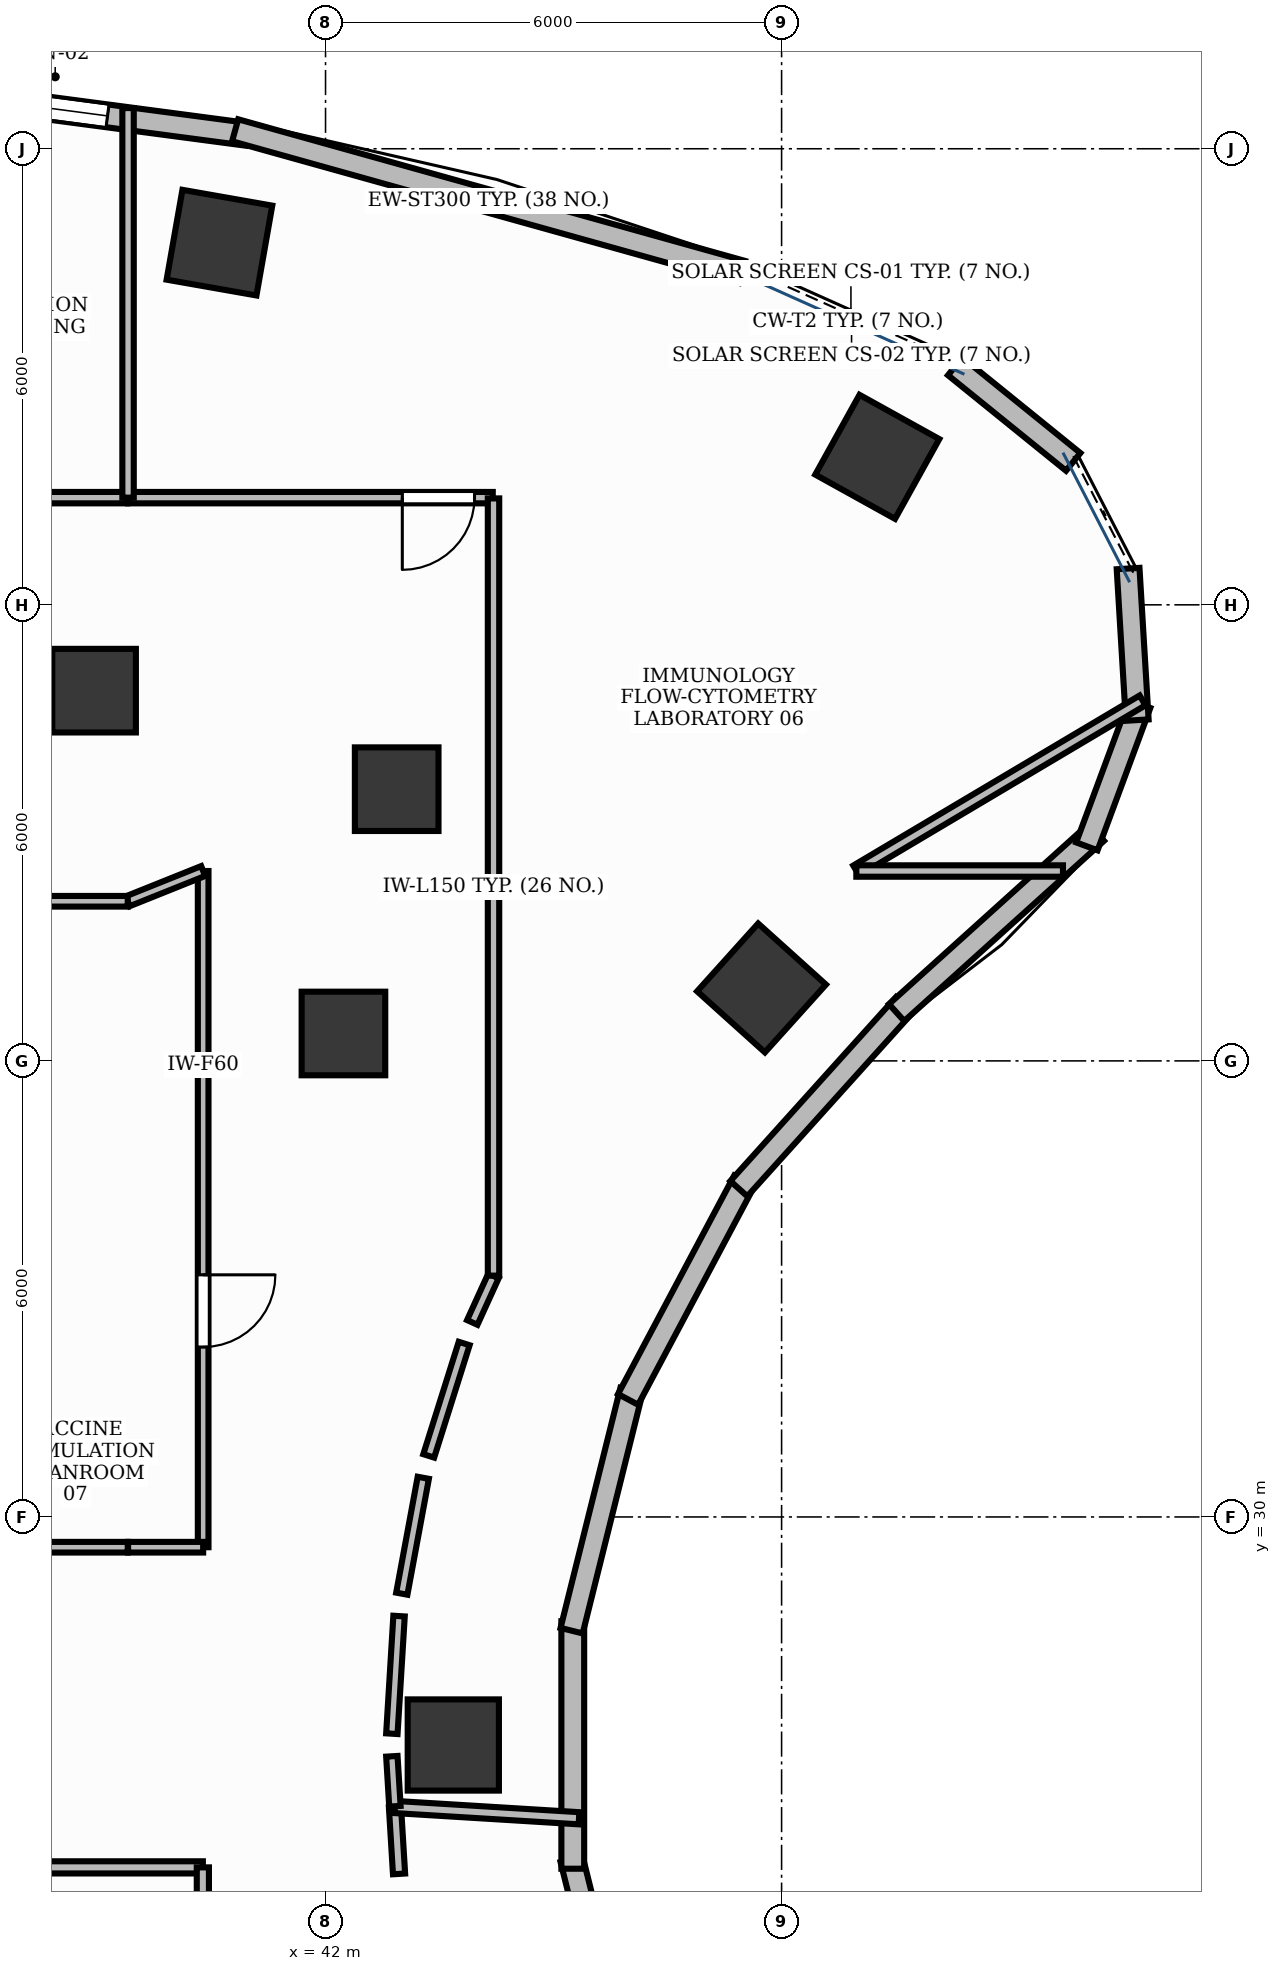
"""IFC4 building model, lengths in metres.
Left out: names, types, materials, properties, quantities, classifications, styles, units other than length and angle.
Written with IfcOpenShell. Run it as: python <this file> out.ifc"""

import sys

from ifc_helpers import new_model, si_unit, direction, frame, frame_2d, origin, origin_2d, place, context, subcontext, project, spatial, rectangle, extrude, element, fill, save


model = new_model("IFC4")
c1 = context("Model", 3, precision=1e-05, world=origin(), true_north=direction((0.0, 1.0)))
c2 = subcontext(c1, "Body", "Model", "MODEL_VIEW")
j1 = project(units=[si_unit("LENGTHUNIT", "METRE"), si_unit("PLANEANGLEUNIT", "RADIAN")], contexts=[c1])
p1 = place(None, origin())
s1 = spatial("IfcSite", under=j1, at=p1, CompositionType="ELEMENT")
p2 = place(p1, origin())
s2 = spatial("IfcBuilding", under=s1, at=p2, CompositionType="ELEMENT")
p3 = place(p2, frame((0.0, 0.0, 90.0)))
s3 = spatial("IfcBuildingStorey", under=s2, at=p3, CompositionType="ELEMENT", Elevation=90.0)
p4 = place(p3, frame((49.259, 43.947, -0.0), z_axis=(0.0, 0.0, 1.0), x_axis=(-0.874535078577, 0.484962262797, 0.0)))
e1 = element("IfcColumn", 1, at=p4, inside=s3, PredefinedType="COLUMN", context=c2, shape_type="SweptSolid", body=[
    extrude(rectangle(XDim=1.2, YDim=1.2, at=origin_2d()), origin(), (0.0, 0.0, 1.0), 3.901),
])
p5 = place(p3, frame((42.936, 39.575, -0.0), z_axis=(0.0, 0.0, 1.0), x_axis=(1.0, 0.0, 0.0)))
e2 = element("IfcColumn", 2, at=p5, inside=s3, PredefinedType="COLUMN", context=c2, shape_type="SweptSolid", body=[
    extrude(rectangle(XDim=1.1, YDim=1.1, at=origin_2d()), origin(), (0.0, 0.0, 1.0), 3.901),
])
p6 = place(p3, frame((40.604, 46.765, -0.0), z_axis=(0.0, 0.0, 1.0), x_axis=(-0.984868307662, 0.173304404339, 0.0)))
e3 = element("IfcColumn", 3, at=p6, inside=s3, PredefinedType="COLUMN", context=c2, shape_type="SweptSolid", body=[
    extrude(rectangle(XDim=1.2, YDim=1.2, at=origin_2d()), origin(), (0.0, 0.0, 1.0), 3.901),
])
p7 = place(p3, frame((38.955, 40.871, -0.0), z_axis=(0.0, 0.0, 1.0), x_axis=(1.0, 0.0, 0.0)))
e4 = element("IfcColumn", 4, at=p7, inside=s3, PredefinedType="COLUMN", context=c2, shape_type="SweptSolid", body=[
    extrude(rectangle(XDim=1.1, YDim=1.1, at=origin_2d()), origin(), (0.0, 0.0, 1.0), 3.901),
])
for number, where, z_axis, x_axis in (
    (5, (43.681, 27.0, -0.0), (0.0, 0.0, 1.0), (0.0, 1.0, 0.0)),
    (6, (47.736, 36.96, -0.0), (0.0, 0.0, 1.0), (0.669, 0.743, 0.0)),
):
    element("IfcColumn", number, at=place(p3, frame(where, z_axis=z_axis, x_axis=x_axis)), inside=s3, PredefinedType="COLUMN", context=c2, shape_type="SweptSolid", body=[
        extrude(rectangle(XDim=1.2, YDim=1.2, at=origin_2d()), origin(), (0.0, 0.0, 1.0), 3.901),
    ])
p8 = place(p3, frame((42.236, 36.361, -0.0), z_axis=(0.0, 0.0, 1.0), x_axis=(1.0, 0.0, 0.0)))
e7 = element("IfcColumn", 7, at=p8, inside=s3, PredefinedType="COLUMN", context=c2, shape_type="SweptSolid", body=[
    extrude(rectangle(XDim=1.1, YDim=1.1, at=origin_2d()), origin(), (0.0, 0.0, 1.0), 3.901),
])
p9 = place(p3, frame((40.964, 48.19, 0.0), z_axis=(0.0, 0.0, 1.0), x_axis=(-0.991369257822, 0.131099178664, 0.0)))
e8 = element("IfcWall", 8, at=p9, inside=s3, PredefinedType="STANDARD", context=c2, shape_type="SweptSolid", body=[
    extrude(rectangle(XDim=3.575, YDim=0.3, at=frame_2d((1.788, 0.0))), origin(), (0.0, 0.0, 1.0), 3.47),
])
p10 = place(p9, frame((1.848, 0.0, 0.95)))
e9 = element("IfcOpeningElement", 9, at=p10, cuts=e8, PredefinedType="OPENING", context=c2, shape_type="SweptSolid", body=[
    extrude(rectangle(XDim=1.5, YDim=1.8, at=frame_2d((0.75, 0.9))), frame((0.0, 0.165, 0.0), z_axis=(0.0, -1.0, 0.0), x_axis=(1.0, 0.0, 0.0)), (0.0, 0.0, 1.0), 0.33),
])
p11 = place(p3, frame((47.479, 46.38, 0.0), z_axis=(0.0, 0.0, 1.0), x_axis=(-0.963116215402, 0.269085777459, 0.0)))
e10 = element("IfcWall", 10, at=p11, inside=s3, PredefinedType="STANDARD", context=c2, shape_type="SweptSolid", body=[
    extrude(rectangle(XDim=6.924, YDim=0.3, at=frame_2d((3.462, 0.0))), origin(), (0.0, 0.0, 1.0), 3.9),
])
p12 = place(p3, frame((46.025, 22.337, 0.0), z_axis=(0.0, 0.0, 1.0), x_axis=(-0.241900409149, 0.970301083197, 0.0)))
e11 = element("IfcWall", 11, at=p12, inside=s3, PredefinedType="STANDARD", context=c2, shape_type="SweptSolid", body=[
    extrude(rectangle(XDim=3.256, YDim=0.3, at=frame_2d((1.628, 0.0))), origin(), (0.0, 0.0, 1.0), 3.9),
])
p13 = place(p3, frame((45.253, 25.372, 0.0), z_axis=(0.0, 0.0, 1.0), x_axis=(0.0, 1.0, 0.0)))
e12 = element("IfcWall", 12, at=p13, inside=s3, PredefinedType="STANDARD", context=c2, shape_type="SweptSolid", body=[
    extrude(rectangle(XDim=3.255, YDim=0.3, at=frame_2d((1.628, 0.0))), origin(), (0.0, 0.0, 1.0), 3.9),
])
p14 = place(p3, frame((45.238, 28.504, 0.0), z_axis=(0.0, 0.0, 1.0), x_axis=(0.241900409149, 0.970301083197, 0.0)))
e13 = element("IfcWall", 13, at=p14, inside=s3, PredefinedType="STANDARD", context=c2, shape_type="SweptSolid", body=[
    extrude(rectangle(XDim=3.256, YDim=0.3, at=frame_2d((1.628, 0.0))), origin(), (0.0, 0.0, 1.0), 3.9),
])
p15 = place(p3, frame((45.98, 31.547, 0.0), z_axis=(0.0, 0.0, 1.0), x_axis=(0.469451284634, 0.882958374645, 0.0)))
e14 = element("IfcWall", 14, at=p15, inside=s3, PredefinedType="STANDARD", context=c2, shape_type="SweptSolid", body=[
    extrude(rectangle(XDim=3.256, YDim=0.3, at=frame_2d((1.628, 0.0))), origin(), (0.0, 0.0, 1.0), 3.9),
])
p16 = place(p3, frame((47.437, 34.319, 0.0), z_axis=(0.0, 0.0, 1.0), x_axis=(0.669167727967, 0.743111399353, 0.0)))
e15 = element("IfcWall", 15, at=p16, inside=s3, PredefinedType="STANDARD", context=c2, shape_type="SweptSolid", body=[
    extrude(rectangle(XDim=3.255, YDim=0.3, at=frame_2d((1.628, 0.0))), origin(), (0.0, 0.0, 1.0), 3.9),
])
p17 = place(p3, frame((49.513, 36.636, 0.0), z_axis=(0.0, 0.0, 1.0), x_axis=(0.74255963233, 0.669779958221, 0.0)))
e16 = element("IfcWall", 16, at=p17, inside=s3, PredefinedType="STANDARD", context=c2, shape_type="SweptSolid", body=[
    extrude(rectangle(XDim=3.539, YDim=0.3, at=frame_2d((1.77, 0.0))), origin(), (0.0, 0.0, 1.0), 3.9),
])
p18 = place(p3, frame((52.016, 38.822, 0.0), z_axis=(0.0, 0.0, 1.0), x_axis=(0.347370087337, 0.937728117539, 0.0)))
e17 = element("IfcWall", 17, at=p18, inside=s3, PredefinedType="STANDARD", context=c2, shape_type="SweptSolid", body=[
    extrude(rectangle(XDim=1.997, YDim=0.3, at=frame_2d((0.999, 0.0))), origin(), (0.0, 0.0, 1.0), 3.9),
])
for number, where, z_axis, x_axis in (
    (18, (52.679, 40.483, 0.0), (0.0, 0.0, 1.0), (-0.06, 0.998, 0.0)),
    (19, (51.836, 43.881, 0.0), (0.0, 0.0, 1.0), (-0.777, 0.629, 0.0)),
):
    element("IfcWall", number, at=place(p3, frame(where, z_axis=z_axis, x_axis=x_axis)), inside=s3, PredefinedType="STANDARD", context=c2, shape_type="SweptSolid", body=[
        extrude(rectangle(XDim=1.998, YDim=0.3, at=frame_2d((0.999, 0.0))), origin(), (0.0, 0.0, 1.0), 3.9),
    ])
p19 = place(p3, frame((44.2, 43.41, 0.0), z_axis=(0.0, 0.0, 1.0), x_axis=(-1.0, 0.0, 0.0)))
e20 = element("IfcWall", 20, at=p19, inside=s3, PredefinedType="PARTITIONING", context=c2, shape_type="SweptSolid", body=[
    extrude(rectangle(XDim=4.798, YDim=0.15, at=frame_2d((2.399, 0.0))), origin(), (0.0, 0.0, 1.0), 2.91),
])
p20 = place(p19, frame((0.24, 0.0, 0.0)))
e21 = element("IfcOpeningElement", 21, at=p20, cuts=e20, PredefinedType="OPENING", context=c2, shape_type="SweptSolid", body=[
    extrude(rectangle(XDim=0.95, YDim=2.15, at=frame_2d((0.475, 1.075))), frame((0.0, 0.09, 0.0), z_axis=(0.0, -1.0, 0.0), x_axis=(1.0, 0.0, 0.0)), (0.0, 0.0, 1.0), 0.18),
])
p21 = place(p3, frame((40.39, 38.498, 0.0), z_axis=(0.0, 0.0, 1.0), x_axis=(0.0, -1.0, 0.0)))
e22 = element("IfcWall", 22, at=p21, inside=s3, PredefinedType="PARTITIONING", context=c2, shape_type="SweptSolid", body=[
    extrude(rectangle(XDim=8.896, YDim=0.14, at=frame_2d((4.448, 0.0))), origin(), (0.0, 0.0, 1.0), 2.91),
])
p22 = place(p21, frame((5.312, 0.0, 0.0)))
e23 = element("IfcOpeningElement", 23, at=p22, cuts=e22, PredefinedType="OPENING", context=c2, shape_type="SweptSolid", body=[
    extrude(rectangle(XDim=0.95, YDim=2.15, at=frame_2d((0.475, 1.075))), frame((0.0, 0.085, 0.0), z_axis=(0.0, -1.0, 0.0), x_axis=(1.0, 0.0, 0.0)), (0.0, 0.0, 1.0), 0.17),
])
p23 = place(p3, frame((39.392, 43.41, 0.0), z_axis=(0.0, 0.0, 1.0), x_axis=(-1.0, 0.0, 0.0)))
e24 = element("IfcWall", 24, at=p23, inside=s3, PredefinedType="PARTITIONING", context=c2, shape_type="SweptSolid", body=[
    extrude(rectangle(XDim=4.196, YDim=0.15, at=frame_2d((2.098, 0.0))), origin(), (0.0, 0.0, 1.0), 2.91),
])
p24 = place(p23, frame((2.748, 0.0, 0.0)))
e25 = element("IfcOpeningElement", 25, at=p24, cuts=e24, PredefinedType="OPENING", context=c2, shape_type="SweptSolid", body=[
    extrude(rectangle(XDim=0.95, YDim=2.15, at=frame_2d((0.475, 1.075))), frame((0.0, 0.09, 0.0), z_axis=(0.0, -1.0, 0.0), x_axis=(1.0, 0.0, 0.0)), (0.0, 0.0, 1.0), 0.18),
])
p25 = place(p3, frame((42.967, 25.304, 0.0), z_axis=(0.0, 0.0, 1.0), x_axis=(-0.061188874166, 0.998126205286, 0.0)))
e26 = element("IfcWall", 26, at=p25, inside=s3, PredefinedType="PARTITIONING", context=c2, shape_type="SweptSolid", body=[
    extrude(rectangle(XDim=0.882, YDim=0.16, at=frame_2d((0.441, 0.0))), origin(), (0.0, 0.0, 1.0), 2.91),
])
p26 = place(p3, frame((42.913, 26.184, 0.0), z_axis=(0.0, 0.0, 1.0), x_axis=(0.998138916893, -0.060981165807, 0.0)))
e27 = element("IfcWall", 27, at=p26, inside=s3, PredefinedType="PARTITIONING", context=c2, shape_type="SweptSolid", body=[
    extrude(rectangle(XDim=2.426, YDim=0.16, at=frame_2d((1.213, 0.0))), origin(), (0.0, 0.0, 1.0), 2.91),
])
p27 = place(p3, frame((37.36, 25.39, 0.0), z_axis=(0.0, 0.0, 1.0), x_axis=(1.0, 0.0, 0.0)))
e28 = element("IfcWall", 28, at=p27, inside=s3, PredefinedType="PARTITIONING", context=c2, shape_type="SweptSolid", body=[
    extrude(rectangle(XDim=3.026, YDim=0.16, at=frame_2d((1.513, 0.0))), origin(), (0.0, 0.0, 1.0), 2.91),
])
p28 = place(p3, frame((40.386, 25.39, 0.0), z_axis=(0.0, 0.0, 1.0), x_axis=(0.0, -1.0, 0.0)))
e29 = element("IfcWall", 29, at=p28, inside=s3, PredefinedType="PARTITIONING", context=c2, shape_type="SweptSolid", body=[
    extrude(rectangle(XDim=1.388, YDim=0.16, at=frame_2d((0.694, 0.0))), origin(), (0.0, 0.0, 1.0), 2.91),
])
p29 = place(p3, frame((52.749, 40.743, 0.0), z_axis=(0.0, 0.0, 1.0), x_axis=(-0.85982416837, -0.510590246173, 0.0)))
e30 = element("IfcWall", 30, at=p29, inside=s3, PredefinedType="PARTITIONING", context=c2, shape_type="SweptSolid", body=[
    extrude(rectangle(XDim=4.382, YDim=0.15, at=frame_2d((2.191, 0.0))), origin(), (0.0, 0.0, 1.0), 2.91),
])
p30 = place(p3, frame((48.983, 38.498, 0.0), z_axis=(0.0, 0.0, 1.0), x_axis=(1.0, 0.0, 0.0)))
e31 = element("IfcWall", 31, at=p30, inside=s3, PredefinedType="PARTITIONING", context=c2, shape_type="SweptSolid", body=[
    extrude(rectangle(XDim=2.719, YDim=0.15, at=frame_2d((1.359, 0.0))), origin(), (0.0, 0.0, 1.0), 2.91),
])
p31 = place(p3, frame((42.913, 26.194, 0.0), z_axis=(0.0, 0.0, 1.0), x_axis=(-0.061177910387, 0.998126877346, 0.0)))
e32 = element("IfcWall", 32, at=p31, inside=s3, PredefinedType="PARTITIONING", context=c2, shape_type="SweptSolid", body=[
    extrude(rectangle(XDim=0.658, YDim=0.15, at=frame_2d((0.329, 0.0))), origin(), (0.0, 0.0, 1.0), 2.91),
])
p32 = place(p3, frame((42.873, 27.149, 0.0), z_axis=(0.0, 0.0, 1.0), x_axis=(0.061103659378, 0.99813142562, 0.0)))
e33 = element("IfcWall", 33, at=p32, inside=s3, PredefinedType="PARTITIONING", context=c2, shape_type="SweptSolid", body=[
    extrude(rectangle(XDim=1.55, YDim=0.15, at=frame_2d((0.775, 0.0))), origin(), (0.0, 0.0, 1.0), 2.91),
])
p33 = place(p3, frame((43.003, 28.991, 0.0), z_axis=(0.0, 0.0, 1.0), x_axis=(0.182168192784, 0.983267384559, 0.0)))
e34 = element("IfcWall", 34, at=p33, inside=s3, PredefinedType="PARTITIONING", context=c2, shape_type="SweptSolid", body=[
    extrude(rectangle(XDim=1.551, YDim=0.15, at=frame_2d((0.775, 0.0))), origin(), (0.0, 0.0, 1.0), 2.91),
])
p34 = place(p3, frame((43.358, 30.803, 0.0), z_axis=(0.0, 0.0, 1.0), x_axis=(0.300641414783, 0.953737248783, 0.0)))
e35 = element("IfcWall", 35, at=p34, inside=s3, PredefinedType="PARTITIONING", context=c2, shape_type="SweptSolid", body=[
    extrude(rectangle(XDim=1.55, YDim=0.15, at=frame_2d((0.775, 0.0))), origin(), (0.0, 0.0, 1.0), 2.91),
])
p35 = place(p3, frame((43.93, 32.559, 0.0), z_axis=(0.0, 0.0, 1.0), x_axis=(0.414377467152, 0.910105111905, 0.0)))
e36 = element("IfcWall", 36, at=p35, inside=s3, PredefinedType="PARTITIONING", context=c2, shape_type="SweptSolid", body=[
    extrude(rectangle(XDim=0.672, YDim=0.15, at=frame_2d((0.336, 0.0))), origin(), (0.0, 0.0, 1.0), 2.91),
])
p36 = place(p3, frame((44.21, 33.175, 0.0), z_axis=(0.0, 0.0, 1.0), x_axis=(0.0, 1.0, 0.0)))
e37 = element("IfcWall", 37, at=p36, inside=s3, PredefinedType="PARTITIONING", context=c2, shape_type="SweptSolid", body=[
    extrude(rectangle(XDim=10.225, YDim=0.15, at=frame_2d((5.112, 0.0))), origin(), (0.0, 0.0, 1.0), 2.91),
])
p37 = place(p3, frame((39.402, 43.41, 0.0), z_axis=(0.0, 0.0, 1.0), x_axis=(0.0, 1.0, 0.0)))
e38 = element("IfcWall", 38, at=p37, inside=s3, PredefinedType="PARTITIONING", context=c2, shape_type="SweptSolid", body=[
    extrude(rectangle(XDim=5.125, YDim=0.15, at=frame_2d((2.563, 0.0))), origin(), (0.0, 0.0, 1.0), 2.91),
])
p38 = place(p3, frame((39.398, 38.1, 0.0), z_axis=(0.0, 0.0, 1.0), x_axis=(0.928098124006, 0.372335698284, 0.0)))
e39 = element("IfcWall", 39, at=p38, inside=s3, PredefinedType="PARTITIONING", context=c2, shape_type="SweptSolid", body=[
    extrude(rectangle(XDim=1.069, YDim=0.14, at=frame_2d((0.534, 0.0))), origin(), (0.0, 0.0, 1.0), 2.91),
])
p39 = place(p3, frame((40.39, 29.602, 0.0), z_axis=(0.0, 0.0, 1.0), x_axis=(-1.0, 0.0, 0.0)))
e40 = element("IfcWall", 40, at=p39, inside=s3, PredefinedType="PARTITIONING", context=c2, shape_type="SweptSolid", body=[
    extrude(rectangle(XDim=0.988, YDim=0.14, at=frame_2d((0.494, 0.0))), origin(), (0.0, 0.0, 1.0), 2.91),
])
p40 = place(p3, frame((39.398, 29.602, 0.0), z_axis=(0.0, 0.0, 1.0), x_axis=(-1.0, 0.0, 0.0)))
e41 = element("IfcWall", 41, at=p40, inside=s3, PredefinedType="PARTITIONING", context=c2, shape_type="SweptSolid", body=[
    extrude(rectangle(XDim=2.038, YDim=0.14, at=frame_2d((1.019, 0.0))), origin(), (0.0, 0.0, 1.0), 2.91),
])
p41 = place(p3, frame((37.21, 38.1, 0.0), z_axis=(0.0, 0.0, 1.0), x_axis=(1.0, 0.0, 0.0)))
e42 = element("IfcWall", 42, at=p41, inside=s3, PredefinedType="PARTITIONING", context=c2, shape_type="SweptSolid", body=[
    extrude(rectangle(XDim=2.188, YDim=0.14, at=frame_2d((1.094, 0.0))), origin(), (0.0, 0.0, 1.0), 2.91),
])
p42 = place(p10, origin())
e43 = element("IfcWindow", 43, at=p42, inside=s3, PartitioningType="DOUBLE_PANEL_VERTICAL", PredefinedType="WINDOW", context=c2, shape_type="SweptSolid", body=[
    extrude(rectangle(XDim=1.5, YDim=1.8, at=frame_2d((0.75, 0.9))), frame((0.0, 0.03, 0.0), z_axis=(0.0, -1.0, 0.0), x_axis=(1.0, 0.0, 0.0)), (0.0, 0.0, 1.0), 0.06),
])
fill(e9, e43)
p43 = place(p20, origin())
e44 = element("IfcDoor", 44, at=p43, inside=s3, OperationType="SINGLE_SWING_RIGHT", PredefinedType="DOOR", context=c2, shape_type="SweptSolid", body=[
    extrude(rectangle(XDim=0.95, YDim=2.15, at=frame_2d((0.475, 1.075))), frame((0.0, 0.025, 0.0), z_axis=(0.0, -1.0, 0.0), x_axis=(1.0, 0.0, 0.0)), (0.0, 0.0, 1.0), 0.05),
])
fill(e21, e44)
p44 = place(p22, origin())
e45 = element("IfcDoor", 45, at=p44, inside=s3, OperationType="SINGLE_SWING_LEFT", PredefinedType="DOOR", context=c2, shape_type="SweptSolid", body=[
    extrude(rectangle(XDim=0.95, YDim=2.15, at=frame_2d((0.475, 1.075))), frame((0.0, 0.025, 0.0), z_axis=(0.0, -1.0, 0.0), x_axis=(1.0, 0.0, 0.0)), (0.0, 0.0, 1.0), 0.05),
])
fill(e23, e45)
save(model, sys.argv[1])
